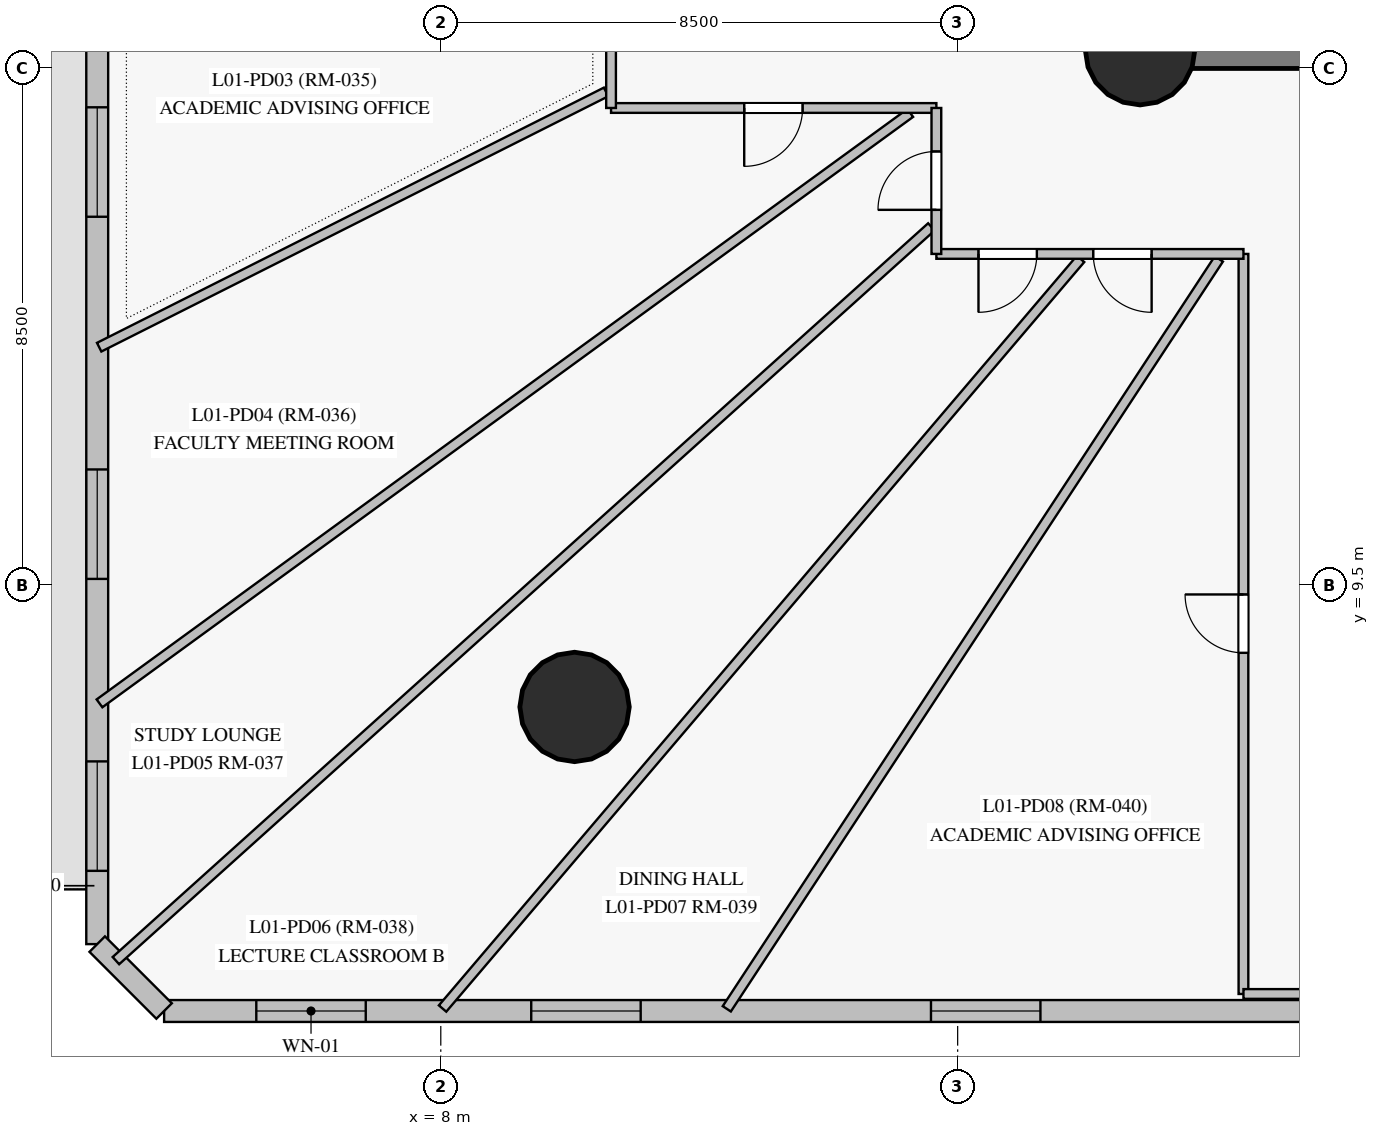
"""IFC4 building model, lengths in metres.
Left out: names, types, materials, properties, quantities, classifications, styles, units other than length and angle.
Written with IfcOpenShell. Run it as: python <this file> out.ifc"""

import sys

from ifc_helpers import new_model, si_unit, direction, frame, frame_2d, origin, origin_with_axes, origin_2d, place, context, subcontext, project, spatial, rectangle, circle, extrude, source, transform, mapped, element, fill, save


model = new_model("IFC4")
c1 = context("Model", 3, precision=1e-05, world=origin(), true_north=direction((0.0, 1.0)))
c2 = subcontext(c1, "Body", "Model", "MODEL_VIEW")
j1 = project(units=[si_unit("LENGTHUNIT", "METRE"), si_unit("PLANEANGLEUNIT", "RADIAN")], contexts=[c1])
p1 = place(None, origin())
s1 = spatial("IfcSite", under=j1, at=p1, CompositionType="ELEMENT")
p2 = place(p1, origin())
s2 = spatial("IfcBuilding", under=s1, at=p2, CompositionType="ELEMENT")
p3 = place(p2, frame((0.0, 0.0, 4.5)))
s3 = spatial("IfcBuildingStorey", under=s2, at=p3, CompositionType="ELEMENT", Elevation=4.5)
p4 = place(p3, frame((19.5, 18.3, 0.0), z_axis=(0.0, 0.0, 1.0), x_axis=(1.0, 0.0, 0.0)))
e1 = element("IfcWall", 1, at=p4, inside=s3, PredefinedType="SHEAR", context=c2, shape_type="SweptSolid", body=[
    extrude(rectangle(XDim=7.05, YDim=0.6, at=frame_2d((3.525, 0.0))), origin(), (0.0, 0.0, 1.0), 4.2),
])
p5 = place(p4, frame((4.2, 0.0, 0.0)))
e2 = element("IfcOpeningElement", 2, at=p5, cuts=e1, PredefinedType="OPENING", context=c2, shape_type="SweptSolid", body=[
    extrude(rectangle(XDim=1.4, YDim=2.2, at=frame_2d((0.7, 1.1))), frame((0.0, 0.31, 0.0), z_axis=(0.0, -1.0, 0.0), x_axis=(1.0, 0.0, 0.0)), (0.0, 0.0, 1.0), 0.62),
])
m1 = source(origin_with_axes(), c2, "Body", "SweptSolid", [
    extrude(circle(Radius=0.9, at=origin_2d()), origin(), (0.0, 0.0, 1.0), 4.5),
])
for number, where, z_axis, x_axis in (
    (3, (19.5, 18.3, 0.0), (0.0, 0.0, 1.0), (1.0, 0.0, 0.0)),
    (4, (10.2, 7.5, 0.0), (0.0, 0.0, 1.0), (1.0, 0.0, 0.0)),
):
    element("IfcColumn", number, at=place(p3, frame(where, z_axis=z_axis, x_axis=x_axis)), inside=s3, PredefinedType="COLUMN", context=c2, shape_type="MappedRepresentation", body=[
        mapped(m1, transform((0.0, 0.0, 0.0), scale=1.0)),
    ])
p6 = place(p3, frame((3.45, 2.5, 0.0), z_axis=(0.0, 0.0, 1.0), x_axis=(1.0, 0.0, 0.0)))
e5 = element("IfcWall", 5, at=p6, inside=s3, PredefinedType="SOLIDWALL", context=c2, shape_type="SweptSolid", body=[
    extrude(rectangle(XDim=51.85, YDim=0.36, at=frame_2d((25.925, 0.0))), origin(), (0.0, 0.0, 1.0), 4.2),
])
p7 = place(p6, frame((1.516, 0.0, 0.85)))
e6 = element("IfcOpeningElement", 6, at=p7, cuts=e5, PredefinedType="OPENING", context=c2, shape_type="SweptSolid", body=[
    extrude(rectangle(XDim=1.8, YDim=2.2, at=frame_2d((0.9, 1.1))), frame((0.0, 0.19, 0.0), z_axis=(0.0, -1.0, 0.0), x_axis=(1.0, 0.0, 0.0)), (0.0, 0.0, 1.0), 0.38),
])
p8 = place(p6, frame((6.037, 0.0, 0.85)))
e7 = element("IfcOpeningElement", 7, at=p8, cuts=e5, PredefinedType="OPENING", context=c2, shape_type="SweptSolid", body=[
    extrude(rectangle(XDim=1.8, YDim=2.2, at=frame_2d((0.9, 1.1))), frame((0.0, 0.19, 0.0), z_axis=(0.0, -1.0, 0.0), x_axis=(1.0, 0.0, 0.0)), (0.0, 0.0, 1.0), 0.38),
])
p9 = place(p6, frame((12.611, 0.0, 0.85)))
e8 = element("IfcOpeningElement", 8, at=p9, cuts=e5, PredefinedType="OPENING", context=c2, shape_type="SweptSolid", body=[
    extrude(rectangle(XDim=1.8, YDim=2.2, at=frame_2d((0.9, 1.1))), frame((0.0, 0.19, 0.0), z_axis=(0.0, -1.0, 0.0), x_axis=(1.0, 0.0, 0.0)), (0.0, 0.0, 1.0), 0.38),
])
p10 = place(p6, frame((18.95, 0.0, 0.85)))
e9 = element("IfcOpeningElement", 9, at=p10, cuts=e5, PredefinedType="OPENING", context=c2, shape_type="SweptSolid", body=[
    extrude(rectangle(XDim=1.8, YDim=2.2, at=frame_2d((0.9, 1.1))), frame((0.0, 0.19, 0.0), z_axis=(0.0, -1.0, 0.0), x_axis=(1.0, 0.0, 0.0)), (0.0, 0.0, 1.0), 0.38),
])
p11 = place(p6, frame((25.523, 0.0, 0.85)))
e10 = element("IfcOpeningElement", 10, at=p11, cuts=e5, PredefinedType="OPENING", context=c2, shape_type="SweptSolid", body=[
    extrude(rectangle(XDim=1.8, YDim=2.2, at=frame_2d((0.9, 1.1))), frame((0.0, 0.19, 0.0), z_axis=(0.0, -1.0, 0.0), x_axis=(1.0, 0.0, 0.0)), (0.0, 0.0, 1.0), 0.38),
])
p12 = place(p6, frame((30.945, 0.0, 0.85)))
e11 = element("IfcOpeningElement", 11, at=p12, cuts=e5, PredefinedType="OPENING", context=c2, shape_type="SweptSolid", body=[
    extrude(rectangle(XDim=1.8, YDim=2.2, at=frame_2d((0.9, 1.1))), frame((0.0, 0.19, 0.0), z_axis=(0.0, -1.0, 0.0), x_axis=(1.0, 0.0, 0.0)), (0.0, 0.0, 1.0), 0.38),
])
p13 = place(p6, frame((34.214, 0.0, 0.85)))
e12 = element("IfcOpeningElement", 12, at=p13, cuts=e5, PredefinedType="OPENING", context=c2, shape_type="SweptSolid", body=[
    extrude(rectangle(XDim=1.8, YDim=2.2, at=frame_2d((0.9, 1.1))), frame((0.0, 0.19, 0.0), z_axis=(0.0, -1.0, 0.0), x_axis=(1.0, 0.0, 0.0)), (0.0, 0.0, 1.0), 0.38),
])
p14 = place(p6, frame((37.394, 0.0, 0.85)))
e13 = element("IfcOpeningElement", 13, at=p14, cuts=e5, PredefinedType="OPENING", context=c2, shape_type="SweptSolid", body=[
    extrude(rectangle(XDim=1.8, YDim=2.2, at=frame_2d((0.9, 1.1))), frame((0.0, 0.19, 0.0), z_axis=(0.0, -1.0, 0.0), x_axis=(1.0, 0.0, 0.0)), (0.0, 0.0, 1.0), 0.38),
])
p15 = place(p6, frame((44.871, 0.0, 0.85)))
e14 = element("IfcOpeningElement", 14, at=p15, cuts=e5, PredefinedType="OPENING", context=c2, shape_type="SweptSolid", body=[
    extrude(rectangle(XDim=1.8, YDim=2.2, at=frame_2d((0.9, 1.1))), frame((0.0, 0.19, 0.0), z_axis=(0.0, -1.0, 0.0), x_axis=(1.0, 0.0, 0.0)), (0.0, 0.0, 1.0), 0.38),
])
p16 = place(p3, frame((2.35, 49.4, 0.0), z_axis=(0.0, 0.0, 1.0), x_axis=(0.0, -1.0, 0.0)))
e15 = element("IfcWall", 15, at=p16, inside=s3, PredefinedType="SOLIDWALL", context=c2, shape_type="SweptSolid", body=[
    extrude(rectangle(XDim=45.8, YDim=0.36, at=frame_2d((22.9, 0.0))), origin(), (0.0, 0.0, 1.0), 4.2),
])
p17 = place(p16, frame((1.655, 0.0, 0.85)))
e16 = element("IfcOpeningElement", 16, at=p17, cuts=e15, PredefinedType="OPENING", context=c2, shape_type="SweptSolid", body=[
    extrude(rectangle(XDim=1.8, YDim=2.2, at=frame_2d((0.9, 1.1))), frame((0.0, 0.19, 0.0), z_axis=(0.0, -1.0, 0.0), x_axis=(1.0, 0.0, 0.0)), (0.0, 0.0, 1.0), 0.38),
])
p18 = place(p16, frame((5.489, 0.0, 0.85)))
e17 = element("IfcOpeningElement", 17, at=p18, cuts=e15, PredefinedType="OPENING", context=c2, shape_type="SweptSolid", body=[
    extrude(rectangle(XDim=1.8, YDim=2.2, at=frame_2d((0.9, 1.1))), frame((0.0, 0.19, 0.0), z_axis=(0.0, -1.0, 0.0), x_axis=(1.0, 0.0, 0.0)), (0.0, 0.0, 1.0), 0.38),
])
p19 = place(p16, frame((19.82, 0.0, 0.85)))
e18 = element("IfcOpeningElement", 18, at=p19, cuts=e15, PredefinedType="OPENING", context=c2, shape_type="SweptSolid", body=[
    extrude(rectangle(XDim=1.8, YDim=2.2, at=frame_2d((0.9, 1.1))), frame((0.0, 0.19, 0.0), z_axis=(0.0, -1.0, 0.0), x_axis=(1.0, 0.0, 0.0)), (0.0, 0.0, 1.0), 0.38),
])
p20 = place(p16, frame((23.368, 0.0, 0.85)))
e19 = element("IfcOpeningElement", 19, at=p20, cuts=e15, PredefinedType="OPENING", context=c2, shape_type="SweptSolid", body=[
    extrude(rectangle(XDim=1.8, YDim=2.2, at=frame_2d((0.9, 1.1))), frame((0.0, 0.19, 0.0), z_axis=(0.0, -1.0, 0.0), x_axis=(1.0, 0.0, 0.0)), (0.0, 0.0, 1.0), 0.38),
])
p21 = place(p16, frame((27.016, 0.0, 0.85)))
e20 = element("IfcOpeningElement", 20, at=p21, cuts=e15, PredefinedType="OPENING", context=c2, shape_type="SweptSolid", body=[
    extrude(rectangle(XDim=1.8, YDim=2.2, at=frame_2d((0.9, 1.1))), frame((0.0, 0.19, 0.0), z_axis=(0.0, -1.0, 0.0), x_axis=(1.0, 0.0, 0.0)), (0.0, 0.0, 1.0), 0.38),
])
p22 = place(p16, frame((32.039, 0.0, 0.85)))
e21 = element("IfcOpeningElement", 21, at=p22, cuts=e15, PredefinedType="OPENING", context=c2, shape_type="SweptSolid", body=[
    extrude(rectangle(XDim=1.8, YDim=2.2, at=frame_2d((0.9, 1.1))), frame((0.0, 0.19, 0.0), z_axis=(0.0, -1.0, 0.0), x_axis=(1.0, 0.0, 0.0)), (0.0, 0.0, 1.0), 0.38),
])
p23 = place(p16, frame((37.994, 0.0, 0.85)))
e22 = element("IfcOpeningElement", 22, at=p23, cuts=e15, PredefinedType="OPENING", context=c2, shape_type="SweptSolid", body=[
    extrude(rectangle(XDim=1.8, YDim=2.2, at=frame_2d((0.9, 1.1))), frame((0.0, 0.19, 0.0), z_axis=(0.0, -1.0, 0.0), x_axis=(1.0, 0.0, 0.0)), (0.0, 0.0, 1.0), 0.38),
])
p24 = place(p16, frame((42.795, 0.0, 0.85)))
e23 = element("IfcOpeningElement", 23, at=p24, cuts=e15, PredefinedType="OPENING", context=c2, shape_type="SweptSolid", body=[
    extrude(rectangle(XDim=1.8, YDim=2.2, at=frame_2d((0.9, 1.1))), frame((0.0, 0.19, 0.0), z_axis=(0.0, -1.0, 0.0), x_axis=(1.0, 0.0, 0.0)), (0.0, 0.0, 1.0), 0.38),
])
p25 = place(p16, frame((14.742, 0.0, 0.0)))
e24 = element("IfcOpeningElement", 24, at=p25, cuts=e15, PredefinedType="OPENING", context=c2, shape_type="SweptSolid", body=[
    extrude(rectangle(XDim=1.05, YDim=2.12, at=frame_2d((0.525, 1.06))), frame((0.0, 0.19, 0.0), z_axis=(0.0, -1.0, 0.0), x_axis=(1.0, 0.0, 0.0)), (0.0, 0.0, 1.0), 0.38),
])
p26 = place(p3, frame((2.35, 3.6, 0.0), z_axis=(0.0, 0.0, 1.0), x_axis=(0.707028305322, -0.707185248342, 0.0)))
e25 = element("IfcWall", 25, at=p26, inside=s3, PredefinedType="SOLIDWALL", context=c2, shape_type="SweptSolid", body=[
    extrude(rectangle(XDim=1.556, YDim=0.36, at=frame_2d((0.778, 0.0))), origin(), (0.0, 0.0, 1.0), 4.2),
])
p27 = place(p3, frame((16.068, 15.395, 0.0), z_axis=(0.0, 0.0, 1.0), x_axis=(-0.743380945554, -0.668868275363, 0.0)))
e26 = element("IfcWall", 26, at=p27, inside=s3, PredefinedType="PARTITIONING", context=c2, shape_type="SweptSolid", body=[
    extrude(rectangle(XDim=18.04, YDim=0.16, at=frame_2d((9.02, 0.0))), origin(), (0.0, 0.0, 1.0), 4.2),
])
p28 = place(p3, frame((15.72, 17.268, 0.0), z_axis=(0.0, 0.0, 1.0), x_axis=(-0.808377474391, -0.588664470557, 0.0)))
e27 = element("IfcWall", 27, at=p28, inside=s3, PredefinedType="PARTITIONING", context=c2, shape_type="SweptSolid", body=[
    extrude(rectangle(XDim=16.493, YDim=0.16, at=frame_2d((8.247, 0.0))), origin(), (0.0, 0.0, 1.0), 4.2),
])
p29 = place(p3, frame((18.521, 14.868, 0.0), z_axis=(0.0, 0.0, 1.0), x_axis=(-0.648138169465, -0.76152275953, 0.0)))
e28 = element("IfcWall", 28, at=p29, inside=s3, PredefinedType="PARTITIONING", context=c2, shape_type="SweptSolid", body=[
    extrude(rectangle(XDim=16.188, YDim=0.16, at=frame_2d((8.094, 0.0))), origin(), (0.0, 0.0, 1.0), 4.2),
])
p30 = place(p3, frame((20.796, 14.868, 0.0), z_axis=(0.0, 0.0, 1.0), x_axis=(-0.548619925722, -0.836071873167, 0.0)))
e29 = element("IfcWall", 29, at=p30, inside=s3, PredefinedType="PARTITIONING", context=c2, shape_type="SweptSolid", body=[
    extrude(rectangle(XDim=14.75, YDim=0.16, at=frame_2d((7.375, 0.0))), origin(), (0.0, 0.0, 1.0), 4.2),
])
p31 = place(p3, frame((21.2, 2.78, 0.0), z_axis=(0.0, 0.0, 1.0), x_axis=(0.0, 1.0, 0.0)))
e30 = element("IfcWall", 30, at=p31, inside=s3, PredefinedType="PARTITIONING", context=c2, shape_type="SweptSolid", body=[
    extrude(rectangle(XDim=12.17, YDim=0.16, at=frame_2d((6.085, 0.0))), origin(), (0.0, 0.0, 1.0), 4.2),
])
p32 = place(p31, frame((5.61, 0.0, 0.0)))
e31 = element("IfcOpeningElement", 31, at=p32, cuts=e30, PredefinedType="OPENING", context=c2, shape_type="SweptSolid", body=[
    extrude(rectangle(XDim=0.96, YDim=2.15, at=frame_2d((0.48, 1.075))), frame((0.0, 0.09, 0.0), z_axis=(0.0, -1.0, 0.0), x_axis=(1.0, 0.0, 0.0)), (0.0, 0.0, 1.0), 0.18),
])
p33 = place(p3, frame((10.718, 17.614, 0.0), z_axis=(0.0, 0.0, 1.0), x_axis=(-0.893173330912, -0.449712575927, 0.0)))
e32 = element("IfcWall", 32, at=p33, inside=s3, PredefinedType="PARTITIONING", context=c2, shape_type="SweptSolid", body=[
    extrude(rectangle(XDim=9.333, YDim=0.16, at=frame_2d((4.667, 0.0))), origin(), (0.0, 0.0, 1.0), 4.2),
])
p34 = place(p3, frame((16.15, 17.35, 0.0), z_axis=(0.0, 0.0, 1.0), x_axis=(-1.0, 0.0, 0.0)))
e33 = element("IfcWall", 33, at=p34, inside=s3, PredefinedType="PARTITIONING", context=c2, shape_type="SweptSolid", body=[
    extrude(rectangle(XDim=5.35, YDim=0.16, at=frame_2d((2.675, 0.0))), origin(), (0.0, 0.0, 1.0), 4.2),
])
p35 = place(p34, frame((2.2, 0.0, 0.0)))
e34 = element("IfcOpeningElement", 34, at=p35, cuts=e33, PredefinedType="OPENING", context=c2, shape_type="SweptSolid", body=[
    extrude(rectangle(XDim=0.96, YDim=2.15, at=frame_2d((0.48, 1.075))), frame((0.0, 0.09, 0.0), z_axis=(0.0, -1.0, 0.0), x_axis=(1.0, 0.0, 0.0)), (0.0, 0.0, 1.0), 0.18),
])
p36 = place(p3, frame((21.2, 14.95, 0.0), z_axis=(0.0, 0.0, 1.0), x_axis=(-1.0, 0.0, 0.0)))
e35 = element("IfcWall", 35, at=p36, inside=s3, PredefinedType="PARTITIONING", context=c2, shape_type="SweptSolid", body=[
    extrude(rectangle(XDim=5.05, YDim=0.16, at=frame_2d((2.525, 0.0))), origin(), (0.0, 0.0, 1.0), 4.2),
])
p37 = place(p36, frame((3.397, 0.0, 0.0)))
e36 = element("IfcOpeningElement", 36, at=p37, cuts=e35, PredefinedType="OPENING", context=c2, shape_type="SweptSolid", body=[
    extrude(rectangle(XDim=0.96, YDim=2.15, at=frame_2d((0.48, 1.075))), frame((0.0, 0.09, 0.0), z_axis=(0.0, -1.0, 0.0), x_axis=(1.0, 0.0, 0.0)), (0.0, 0.0, 1.0), 0.18),
])
p38 = place(p36, frame((1.51, 0.0, 0.0)))
e37 = element("IfcOpeningElement", 37, at=p38, cuts=e35, PredefinedType="OPENING", context=c2, shape_type="SweptSolid", body=[
    extrude(rectangle(XDim=0.96, YDim=2.15, at=frame_2d((0.48, 1.075))), frame((0.0, 0.09, 0.0), z_axis=(0.0, -1.0, 0.0), x_axis=(1.0, 0.0, 0.0)), (0.0, 0.0, 1.0), 0.18),
])
p39 = place(p3, frame((25.4, 2.78, 0.0), z_axis=(0.0, 0.0, 1.0), x_axis=(-1.0, 0.0, 0.0)))
e38 = element("IfcWall", 38, at=p39, inside=s3, PredefinedType="PARTITIONING", context=c2, shape_type="SweptSolid", body=[
    extrude(rectangle(XDim=4.2, YDim=0.16, at=frame_2d((2.1, 0.0))), origin(), (0.0, 0.0, 1.0), 4.2),
])
p40 = place(p3, frame((10.8, 17.35, 0.0), z_axis=(0.0, 0.0, 1.0), x_axis=(0.0, 1.0, 0.0)))
e39 = element("IfcWall", 39, at=p40, inside=s3, PredefinedType="PARTITIONING", context=c2, shape_type="SweptSolid", body=[
    extrude(rectangle(XDim=3.07, YDim=0.16, at=frame_2d((1.535, 0.0))), origin(), (0.0, 0.0, 1.0), 3.25),
])
p41 = place(p3, frame((16.15, 14.95, 0.0), z_axis=(0.0, 0.0, 1.0), x_axis=(0.0, 1.0, 0.0)))
e40 = element("IfcWall", 40, at=p41, inside=s3, PredefinedType="PARTITIONING", context=c2, shape_type="SweptSolid", body=[
    extrude(rectangle(XDim=2.4, YDim=0.16, at=frame_2d((1.2, 0.0))), origin(), (0.0, 0.0, 1.0), 3.25),
])
p42 = place(p41, frame((0.725, 0.0, 0.0)))
e41 = element("IfcOpeningElement", 41, at=p42, cuts=e40, PredefinedType="OPENING", context=c2, shape_type="SweptSolid", body=[
    extrude(rectangle(XDim=0.96, YDim=2.15, at=frame_2d((0.48, 1.075))), frame((0.0, 0.09, 0.0), z_axis=(0.0, -1.0, 0.0), x_axis=(1.0, 0.0, 0.0)), (0.0, 0.0, 1.0), 0.18),
])
m2 = source(origin_with_axes(), c2, "Body", "SweptSolid", [
    extrude(rectangle(XDim=1.8, YDim=2.2, at=frame_2d((0.9, 1.1))), frame((0.0, 0.03, 0.0), z_axis=(0.0, -1.0, 0.0), x_axis=(1.0, 0.0, 0.0)), (0.0, 0.0, 1.0), 0.06),
])
p43 = place(p7, origin())
e42 = element("IfcWindow", 42, at=p43, inside=s3, PartitioningType="SINGLE_PANEL", PredefinedType="WINDOW", context=c2, shape_type="MappedRepresentation", body=[
    mapped(m2, transform((0.0, 0.0, 0.0), scale=1.0)),
])
fill(e6, e42)
p44 = place(p8, origin())
e43 = element("IfcWindow", 43, at=p44, inside=s3, PartitioningType="SINGLE_PANEL", PredefinedType="WINDOW", context=c2, shape_type="MappedRepresentation", body=[
    mapped(m2, transform((0.0, 0.0, 0.0), scale=1.0)),
])
fill(e7, e43)
p45 = place(p9, origin())
e44 = element("IfcWindow", 44, at=p45, inside=s3, PartitioningType="SINGLE_PANEL", PredefinedType="WINDOW", context=c2, shape_type="MappedRepresentation", body=[
    mapped(m2, transform((0.0, 0.0, 0.0), scale=1.0)),
])
fill(e8, e44)
p46 = place(p22, origin())
e45 = element("IfcWindow", 45, at=p46, inside=s3, PartitioningType="SINGLE_PANEL", PredefinedType="WINDOW", context=c2, shape_type="MappedRepresentation", body=[
    mapped(m2, transform((0.0, 0.0, 0.0), scale=1.0)),
])
fill(e21, e45)
p47 = place(p23, origin())
e46 = element("IfcWindow", 46, at=p47, inside=s3, PartitioningType="SINGLE_PANEL", PredefinedType="WINDOW", context=c2, shape_type="MappedRepresentation", body=[
    mapped(m2, transform((0.0, 0.0, 0.0), scale=1.0)),
])
fill(e22, e46)
p48 = place(p24, origin())
e47 = element("IfcWindow", 47, at=p48, inside=s3, PartitioningType="SINGLE_PANEL", PredefinedType="WINDOW", context=c2, shape_type="MappedRepresentation", body=[
    mapped(m2, transform((0.0, 0.0, 0.0), scale=1.0)),
])
fill(e23, e47)
m3 = source(origin_with_axes(), c2, "Body", "SweptSolid", [
    extrude(rectangle(XDim=0.96, YDim=2.15, at=frame_2d((0.48, 1.075))), frame((0.0, 0.025, 0.0), z_axis=(0.0, -1.0, 0.0), x_axis=(1.0, 0.0, 0.0)), (0.0, 0.0, 1.0), 0.05),
])
p49 = place(p35, origin())
e48 = element("IfcDoor", 48, at=p49, inside=s3, OperationType="SINGLE_SWING_RIGHT", PredefinedType="DOOR", context=c2, shape_type="MappedRepresentation", body=[
    mapped(m3, transform((0.0, 0.0, 0.0), scale=1.0)),
])
fill(e34, e48)
p50 = place(p42, origin())
e49 = element("IfcDoor", 49, at=p50, inside=s3, OperationType="SINGLE_SWING_LEFT", PredefinedType="DOOR", context=c2, shape_type="MappedRepresentation", body=[
    mapped(m3, transform((0.0, 0.0, 0.0), scale=1.0)),
])
fill(e41, e49)
p51 = place(p37, origin())
e50 = element("IfcDoor", 50, at=p51, inside=s3, OperationType="SINGLE_SWING_RIGHT", PredefinedType="DOOR", context=c2, shape_type="MappedRepresentation", body=[
    mapped(m3, transform((0.0, 0.0, 0.0), scale=1.0)),
])
fill(e36, e50)
p52 = place(p38, origin())
e51 = element("IfcDoor", 51, at=p52, inside=s3, OperationType="SINGLE_SWING_LEFT", PredefinedType="DOOR", context=c2, shape_type="MappedRepresentation", body=[
    mapped(m3, transform((0.0, 0.0, 0.0), scale=1.0)),
])
fill(e37, e51)
p53 = place(p32, origin())
e52 = element("IfcDoor", 52, at=p53, inside=s3, OperationType="SINGLE_SWING_RIGHT", PredefinedType="DOOR", context=c2, shape_type="MappedRepresentation", body=[
    mapped(m3, transform((0.0, 0.0, 0.0), scale=1.0)),
])
fill(e31, e52)
save(model, sys.argv[1])
